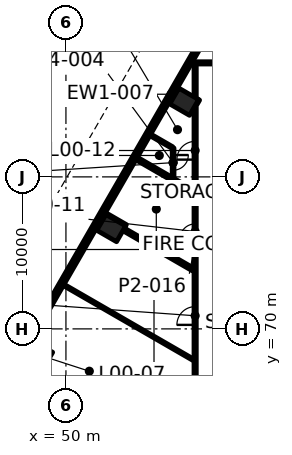
"""IFC4 building model, lengths in metres.
Left out: names, types, materials, properties, quantities, classifications, styles, units other than length and angle.
Written with IfcOpenShell. Run it as: python <this file> out.ifc"""

import sys

from ifc_helpers import new_model, si_unit, direction, frame, frame_2d, origin, origin_2d, place, context, subcontext, project, spatial, rectangle, extrude, element, fill, save


model = new_model("IFC4")
c1 = context("Model", 3, precision=1e-05, world=origin(), true_north=direction((0.0, 1.0)))
c2 = subcontext(c1, "Body", "Model", "MODEL_VIEW")
j1 = project(units=[si_unit("LENGTHUNIT", "METRE"), si_unit("PLANEANGLEUNIT", "RADIAN")], contexts=[c1])
p1 = place(None, origin())
s1 = spatial("IfcSite", under=j1, at=p1, CompositionType="ELEMENT")
p2 = place(p1, origin())
s2 = spatial("IfcBuilding", under=s1, at=p2, CompositionType="ELEMENT")
p3 = place(p2, origin())
s3 = spatial("IfcBuildingStorey", under=s2, at=p3, CompositionType="ELEMENT", Elevation=0.0)
for number, where, z_axis, x_axis in (
    (1, (57.78, 84.942, 0.0), (0.0, 0.0, 1.0), (-0.5, -0.866, 0.0)),
    (2, (52.979, 76.628, 0.0), (0.0, 0.0, 1.0), (-0.5, -0.866, 0.0)),
    (3, (48.179, 68.315, 0.0), (0.0, 0.0, 1.0), (-0.5, -0.866, 0.0)),
):
    element("IfcColumn", number, at=place(p3, frame(where, z_axis=z_axis, x_axis=x_axis)), inside=s3, PredefinedType="COLUMN", context=c2, shape_type="SweptSolid", body=[
        extrude(rectangle(XDim=1.2, YDim=1.5, at=origin_2d()), origin(), (0.0, 0.0, 1.0), 8.0),
    ])
p4 = place(p3, frame((58.563, 87.5, 0.0), z_axis=(0.0, 0.0, 1.0), x_axis=(1.0, 0.0, 0.0)))
e4 = element("IfcWall", 4, at=p4, inside=s3, PredefinedType="PARTITIONING", context=c2, shape_type="SweptSolid", body=[
    extrude(rectangle(XDim=9.662, YDim=0.15, at=frame_2d((4.831, 0.0))), origin(), (0.0, 0.0, 1.0), 6.865),
])
p5 = place(p4, frame((4.381, 0.0, 0.0)))
e5 = element("IfcOpeningElement", 5, at=p5, cuts=e4, PredefinedType="OPENING", context=c2, shape_type="SweptSolid", body=[
    extrude(rectangle(XDim=0.9, YDim=2.1, at=frame_2d((0.45, 1.05))), frame((0.0, 0.085, 0.0), z_axis=(0.0, -1.0, 0.0), x_axis=(1.0, 0.0, 0.0)), (0.0, 0.0, 1.0), 0.17),
])
p6 = place(p3, frame((58.575, 84.821, 0.0), z_axis=(0.0, 0.0, 1.0), x_axis=(0.500317227461, 0.865842174941, 0.0)))
e6 = element("IfcWall", 6, at=p6, inside=s3, PredefinedType="PARTITIONING", context=c2, shape_type="SweptSolid", body=[
    extrude(rectangle(XDim=0.308, YDim=0.15, at=frame_2d((0.154, 0.0))), origin(), (0.0, 0.0, 1.0), 7.1),
])
p7 = place(p3, frame((58.5, 66.513, 0.0), z_axis=(0.0, 0.0, 1.0), x_axis=(0.0, 1.0, 0.0)))
e7 = element("IfcWall", 7, at=p7, inside=s3, PredefinedType="PARTITIONING", context=c2, shape_type="SweptSolid", body=[
    extrude(rectangle(XDim=18.177, YDim=0.15, at=frame_2d((9.089, 0.0))), origin(), (0.0, 0.0, 1.0), 7.1),
])
p8 = place(p7, frame((3.75, 0.0, 0.0)))
e8 = element("IfcOpeningElement", 8, at=p8, cuts=e7, PredefinedType="OPENING", context=c2, shape_type="SweptSolid", body=[
    extrude(rectangle(XDim=1.2, YDim=2.1, at=frame_2d((0.6, 1.05))), frame((0.0, 0.085, 0.0), z_axis=(0.0, -1.0, 0.0), x_axis=(1.0, 0.0, 0.0)), (0.0, 0.0, 1.0), 0.17),
])
p9 = place(p7, frame((9.393, 0.0, 0.0)))
e9 = element("IfcOpeningElement", 9, at=p9, cuts=e7, PredefinedType="OPENING", context=c2, shape_type="SweptSolid", body=[
    extrude(rectangle(XDim=1.0, YDim=2.1, at=frame_2d((0.5, 1.05))), frame((0.0, 0.085, 0.0), z_axis=(0.0, -1.0, 0.0), x_axis=(1.0, 0.0, 0.0)), (0.0, 0.0, 1.0), 0.17),
])
p10 = place(p7, frame((14.623, 0.0, 0.0)))
e10 = element("IfcOpeningElement", 10, at=p10, cuts=e7, PredefinedType="OPENING", context=c2, shape_type="SweptSolid", body=[
    extrude(rectangle(XDim=1.2, YDim=2.1, at=frame_2d((0.6, 1.05))), frame((0.0, 0.085, 0.0), z_axis=(0.0, -1.0, 0.0), x_axis=(1.0, 0.0, 0.0)), (0.0, 0.0, 1.0), 0.17),
])
p11 = place(p3, frame((58.5, 85.219, 0.0), z_axis=(0.0, 0.0, 1.0), x_axis=(0.0, 1.0, 0.0)))
e11 = element("IfcWall", 11, at=p11, inside=s3, PredefinedType="PARTITIONING", context=c2, shape_type="SweptSolid", body=[
    extrude(rectangle(XDim=2.17, YDim=0.15, at=frame_2d((1.085, 0.0))), origin(), (0.0, 0.0, 1.0), 6.865),
])
p12 = place(p3, frame((57.05, 81.899, 0.0), z_axis=(0.0, 0.0, 1.0), x_axis=(0.0, -1.0, 0.0)))
e12 = element("IfcWall", 12, at=p12, inside=s3, PredefinedType="PARTITIONING", context=c2, shape_type="SweptSolid", body=[
    extrude(rectangle(XDim=1.923, YDim=0.12, at=frame_2d((0.961, 0.0))), origin(), (0.0, 0.0, 1.0), 7.1),
])
p13 = place(p12, frame((0.461, 0.0, 0.0)))
e13 = element("IfcOpeningElement", 13, at=p13, cuts=e12, PredefinedType="OPENING", context=c2, shape_type="SweptSolid", body=[
    extrude(rectangle(XDim=1.0, YDim=2.1, at=frame_2d((0.5, 1.05))), frame((0.0, 0.07, 0.0), z_axis=(0.0, -1.0, 0.0), x_axis=(1.0, 0.0, 0.0)), (0.0, 0.0, 1.0), 0.14),
])
p14 = place(p3, frame((56.99, 81.934, 0.0), z_axis=(0.0, 0.0, 1.0), x_axis=(-0.866055292018, 0.499948228488, 0.0)))
e14 = element("IfcWall", 14, at=p14, inside=s3, PredefinedType="PARTITIONING", context=c2, shape_type="SweptSolid", body=[
    extrude(rectangle(XDim=1.779, YDim=0.12, at=frame_2d((0.889, 0.0))), origin(), (0.0, 0.0, 1.0), 6.865),
])
p15 = place(p3, frame((58.373, 79.057, 0.0), z_axis=(0.0, 0.0, 1.0), x_axis=(-0.866032712554, 0.499987340626, 0.0)))
e15 = element("IfcWall", 15, at=p15, inside=s3, PredefinedType="PARTITIONING", context=c2, shape_type="SweptSolid", body=[
    extrude(rectangle(XDim=4.415, YDim=0.2, at=frame_2d((2.207, 0.0))), origin(), (0.0, 0.0, 1.0), 6.865),
])
p16 = place(p3, frame((53.928, 76.773, 0.0), z_axis=(0.0, 0.0, 1.0), x_axis=(-0.866026058841, 0.499998865407, 0.0)))
e16 = element("IfcWall", 16, at=p16, inside=s3, PredefinedType="PARTITIONING", context=c2, shape_type="SweptSolid", body=[
    extrude(rectangle(XDim=1.708, YDim=0.2, at=frame_2d((0.854, 0.0))), origin(), (0.0, 0.0, 1.0), 6.865),
])
p17 = place(p3, frame((58.373, 73.901, 0.0), z_axis=(0.0, 0.0, 1.0), x_axis=(-0.866022471755, 0.50000507839, 0.0)))
e17 = element("IfcWall", 17, at=p17, inside=s3, PredefinedType="PARTITIONING", context=c2, shape_type="SweptSolid", body=[
    extrude(rectangle(XDim=5.284, YDim=0.2, at=frame_2d((2.642, 0.0))), origin(), (0.0, 0.0, 1.0), 7.1),
])
p18 = place(p3, frame((58.399, 67.957, 0.0), z_axis=(0.0, 0.0, 1.0), x_axis=(-0.866029270811, 0.499993302054, 0.0)))
e18 = element("IfcWall", 18, at=p18, inside=s3, PredefinedType="PARTITIONING", context=c2, shape_type="SweptSolid", body=[
    extrude(rectangle(XDim=9.988, YDim=0.1, at=frame_2d((4.994, 0.0))), origin(), (0.0, 0.0, 1.0), 6.865),
])
p19 = place(p3, frame((71.348, 110.424, 0.0), z_axis=(0.0, 0.0, 1.0), x_axis=(-0.500000550228, -0.86602508611, 0.0)))
e19 = element("IfcWall", 19, at=p19, inside=s3, PredefinedType="SOLIDWALL", context=c2, shape_type="SweptSolid", body=[
    extrude(rectangle(XDim=57.704, YDim=0.3, at=frame_2d((28.852, 0.0))), origin(), (0.0, 0.0, 1.0), 7.7),
])
p20 = place(p19, frame((16.711, 0.0, 0.0)))
e20 = element("IfcOpeningElement", 20, at=p20, cuts=e19, PredefinedType="OPENING", context=c2, shape_type="SweptSolid", body=[
    extrude(rectangle(XDim=1.2, YDim=2.4, at=frame_2d((0.6, 1.2))), frame((0.0, 0.16, 0.0), z_axis=(0.0, -1.0, 0.0), x_axis=(1.0, 0.0, 0.0)), (0.0, 0.0, 1.0), 0.32),
])
p21 = place(p19, frame((1.552, 0.0, 0.15)))
e21 = element("IfcOpeningElement", 21, at=p21, cuts=e19, PredefinedType="OPENING", context=c2, shape_type="SweptSolid", body=[
    extrude(rectangle(XDim=2.1, YDim=5.4, at=frame_2d((1.05, 2.7))), frame((0.0, 0.16, 0.0), z_axis=(0.0, -1.0, 0.0), x_axis=(1.0, 0.0, 0.0)), (0.0, 0.0, 1.0), 0.32),
])
p22 = place(p19, frame((4.052, 0.0, 0.15)))
e22 = element("IfcOpeningElement", 22, at=p22, cuts=e19, PredefinedType="OPENING", context=c2, shape_type="SweptSolid", body=[
    extrude(rectangle(XDim=2.1, YDim=5.4, at=frame_2d((1.05, 2.7))), frame((0.0, 0.16, 0.0), z_axis=(0.0, -1.0, 0.0), x_axis=(1.0, 0.0, 0.0)), (0.0, 0.0, 1.0), 0.32),
])
p23 = place(p19, frame((6.552, 0.0, 0.15)))
e23 = element("IfcOpeningElement", 23, at=p23, cuts=e19, PredefinedType="OPENING", context=c2, shape_type="SweptSolid", body=[
    extrude(rectangle(XDim=2.1, YDim=5.4, at=frame_2d((1.05, 2.7))), frame((0.0, 0.16, 0.0), z_axis=(0.0, -1.0, 0.0), x_axis=(1.0, 0.0, 0.0)), (0.0, 0.0, 1.0), 0.32),
])
p24 = place(p19, frame((9.052, 0.0, 0.15)))
e24 = element("IfcOpeningElement", 24, at=p24, cuts=e19, PredefinedType="OPENING", context=c2, shape_type="SweptSolid", body=[
    extrude(rectangle(XDim=2.1, YDim=5.4, at=frame_2d((1.05, 2.7))), frame((0.0, 0.16, 0.0), z_axis=(0.0, -1.0, 0.0), x_axis=(1.0, 0.0, 0.0)), (0.0, 0.0, 1.0), 0.32),
])
p25 = place(p19, frame((11.552, 0.0, 0.15)))
e25 = element("IfcOpeningElement", 25, at=p25, cuts=e19, PredefinedType="OPENING", context=c2, shape_type="SweptSolid", body=[
    extrude(rectangle(XDim=2.1, YDim=5.4, at=frame_2d((1.05, 2.7))), frame((0.0, 0.16, 0.0), z_axis=(0.0, -1.0, 0.0), x_axis=(1.0, 0.0, 0.0)), (0.0, 0.0, 1.0), 0.32),
])
p26 = place(p19, frame((14.052, 0.0, 0.15)))
e26 = element("IfcOpeningElement", 26, at=p26, cuts=e19, PredefinedType="OPENING", context=c2, shape_type="SweptSolid", body=[
    extrude(rectangle(XDim=2.1, YDim=5.4, at=frame_2d((1.05, 2.7))), frame((0.0, 0.16, 0.0), z_axis=(0.0, -1.0, 0.0), x_axis=(1.0, 0.0, 0.0)), (0.0, 0.0, 1.0), 0.32),
])
p27 = place(p19, frame((19.052, 0.0, 0.15)))
e27 = element("IfcOpeningElement", 27, at=p27, cuts=e19, PredefinedType="OPENING", context=c2, shape_type="SweptSolid", body=[
    extrude(rectangle(XDim=2.1, YDim=5.4, at=frame_2d((1.05, 2.7))), frame((0.0, 0.16, 0.0), z_axis=(0.0, -1.0, 0.0), x_axis=(1.0, 0.0, 0.0)), (0.0, 0.0, 1.0), 0.32),
])
p28 = place(p19, frame((21.552, 0.0, 0.15)))
e28 = element("IfcOpeningElement", 28, at=p28, cuts=e19, PredefinedType="OPENING", context=c2, shape_type="SweptSolid", body=[
    extrude(rectangle(XDim=2.1, YDim=5.4, at=frame_2d((1.05, 2.7))), frame((0.0, 0.16, 0.0), z_axis=(0.0, -1.0, 0.0), x_axis=(1.0, 0.0, 0.0)), (0.0, 0.0, 1.0), 0.32),
])
p29 = place(p19, frame((24.052, 0.0, 0.15)))
e29 = element("IfcOpeningElement", 29, at=p29, cuts=e19, PredefinedType="OPENING", context=c2, shape_type="SweptSolid", body=[
    extrude(rectangle(XDim=2.1, YDim=5.4, at=frame_2d((1.05, 2.7))), frame((0.0, 0.16, 0.0), z_axis=(0.0, -1.0, 0.0), x_axis=(1.0, 0.0, 0.0)), (0.0, 0.0, 1.0), 0.32),
])
p30 = place(p19, frame((26.552, 0.0, 0.15)))
e30 = element("IfcOpeningElement", 30, at=p30, cuts=e19, PredefinedType="OPENING", context=c2, shape_type="SweptSolid", body=[
    extrude(rectangle(XDim=2.1, YDim=5.4, at=frame_2d((1.05, 2.7))), frame((0.0, 0.16, 0.0), z_axis=(0.0, -1.0, 0.0), x_axis=(1.0, 0.0, 0.0)), (0.0, 0.0, 1.0), 0.32),
])
p31 = place(p19, frame((29.052, 0.0, 0.15)))
e31 = element("IfcOpeningElement", 31, at=p31, cuts=e19, PredefinedType="OPENING", context=c2, shape_type="SweptSolid", body=[
    extrude(rectangle(XDim=2.1, YDim=5.4, at=frame_2d((1.05, 2.7))), frame((0.0, 0.16, 0.0), z_axis=(0.0, -1.0, 0.0), x_axis=(1.0, 0.0, 0.0)), (0.0, 0.0, 1.0), 0.32),
])
p32 = place(p19, frame((31.552, 0.0, 0.15)))
e32 = element("IfcOpeningElement", 32, at=p32, cuts=e19, PredefinedType="OPENING", context=c2, shape_type="SweptSolid", body=[
    extrude(rectangle(XDim=2.1, YDim=5.4, at=frame_2d((1.05, 2.7))), frame((0.0, 0.16, 0.0), z_axis=(0.0, -1.0, 0.0), x_axis=(1.0, 0.0, 0.0)), (0.0, 0.0, 1.0), 0.32),
])
p33 = place(p19, frame((34.052, 0.0, 0.15)))
e33 = element("IfcOpeningElement", 33, at=p33, cuts=e19, PredefinedType="OPENING", context=c2, shape_type="SweptSolid", body=[
    extrude(rectangle(XDim=2.1, YDim=5.4, at=frame_2d((1.05, 2.7))), frame((0.0, 0.16, 0.0), z_axis=(0.0, -1.0, 0.0), x_axis=(1.0, 0.0, 0.0)), (0.0, 0.0, 1.0), 0.32),
])
p34 = place(p19, frame((36.552, 0.0, 0.15)))
e34 = element("IfcOpeningElement", 34, at=p34, cuts=e19, PredefinedType="OPENING", context=c2, shape_type="SweptSolid", body=[
    extrude(rectangle(XDim=2.1, YDim=5.4, at=frame_2d((1.05, 2.7))), frame((0.0, 0.16, 0.0), z_axis=(0.0, -1.0, 0.0), x_axis=(1.0, 0.0, 0.0)), (0.0, 0.0, 1.0), 0.32),
])
p35 = place(p19, frame((39.052, 0.0, 0.15)))
e35 = element("IfcOpeningElement", 35, at=p35, cuts=e19, PredefinedType="OPENING", context=c2, shape_type="SweptSolid", body=[
    extrude(rectangle(XDim=2.1, YDim=5.4, at=frame_2d((1.05, 2.7))), frame((0.0, 0.16, 0.0), z_axis=(0.0, -1.0, 0.0), x_axis=(1.0, 0.0, 0.0)), (0.0, 0.0, 1.0), 0.32),
])
p36 = place(p19, frame((41.552, 0.0, 0.15)))
e36 = element("IfcOpeningElement", 36, at=p36, cuts=e19, PredefinedType="OPENING", context=c2, shape_type="SweptSolid", body=[
    extrude(rectangle(XDim=2.1, YDim=5.4, at=frame_2d((1.05, 2.7))), frame((0.0, 0.16, 0.0), z_axis=(0.0, -1.0, 0.0), x_axis=(1.0, 0.0, 0.0)), (0.0, 0.0, 1.0), 0.32),
])
p37 = place(p19, frame((44.052, 0.0, 0.15)))
e37 = element("IfcOpeningElement", 37, at=p37, cuts=e19, PredefinedType="OPENING", context=c2, shape_type="SweptSolid", body=[
    extrude(rectangle(XDim=2.1, YDim=5.4, at=frame_2d((1.05, 2.7))), frame((0.0, 0.16, 0.0), z_axis=(0.0, -1.0, 0.0), x_axis=(1.0, 0.0, 0.0)), (0.0, 0.0, 1.0), 0.32),
])
p38 = place(p19, frame((46.552, 0.0, 0.15)))
e38 = element("IfcOpeningElement", 38, at=p38, cuts=e19, PredefinedType="OPENING", context=c2, shape_type="SweptSolid", body=[
    extrude(rectangle(XDim=2.1, YDim=5.4, at=frame_2d((1.05, 2.7))), frame((0.0, 0.16, 0.0), z_axis=(0.0, -1.0, 0.0), x_axis=(1.0, 0.0, 0.0)), (0.0, 0.0, 1.0), 0.32),
])
p39 = place(p19, frame((49.052, 0.0, 0.15)))
e39 = element("IfcOpeningElement", 39, at=p39, cuts=e19, PredefinedType="OPENING", context=c2, shape_type="SweptSolid", body=[
    extrude(rectangle(XDim=2.1, YDim=5.4, at=frame_2d((1.05, 2.7))), frame((0.0, 0.16, 0.0), z_axis=(0.0, -1.0, 0.0), x_axis=(1.0, 0.0, 0.0)), (0.0, 0.0, 1.0), 0.32),
])
p40 = place(p19, frame((51.552, 0.0, 0.15)))
e40 = element("IfcOpeningElement", 40, at=p40, cuts=e19, PredefinedType="OPENING", context=c2, shape_type="SweptSolid", body=[
    extrude(rectangle(XDim=2.1, YDim=5.4, at=frame_2d((1.05, 2.7))), frame((0.0, 0.16, 0.0), z_axis=(0.0, -1.0, 0.0), x_axis=(1.0, 0.0, 0.0)), (0.0, 0.0, 1.0), 0.32),
])
p41 = place(p19, frame((54.052, 0.0, 0.15)))
e41 = element("IfcOpeningElement", 41, at=p41, cuts=e19, PredefinedType="OPENING", context=c2, shape_type="SweptSolid", body=[
    extrude(rectangle(XDim=2.1, YDim=5.4, at=frame_2d((1.05, 2.7))), frame((0.0, 0.16, 0.0), z_axis=(0.0, -1.0, 0.0), x_axis=(1.0, 0.0, 0.0)), (0.0, 0.0, 1.0), 0.32),
])
p42 = place(p8, origin())
e42 = element("IfcDoor", 42, at=p42, inside=s3, OperationType="DOUBLE_DOOR_SINGLE_SWING", PredefinedType="DOOR", context=c2, shape_type="SweptSolid", body=[
    extrude(rectangle(XDim=1.2, YDim=2.1, at=frame_2d((0.6, 1.05))), frame((0.0, 0.025, 0.0), z_axis=(0.0, -1.0, 0.0), x_axis=(1.0, 0.0, 0.0)), (0.0, 0.0, 1.0), 0.05),
])
fill(e8, e42)
p43 = place(p9, origin())
e43 = element("IfcDoor", 43, at=p43, inside=s3, OperationType="SINGLE_SWING_RIGHT", PredefinedType="DOOR", context=c2, shape_type="SweptSolid", body=[
    extrude(rectangle(XDim=1.0, YDim=2.1, at=frame_2d((0.5, 1.05))), frame((0.0, 0.025, 0.0), z_axis=(0.0, -1.0, 0.0), x_axis=(1.0, 0.0, 0.0)), (0.0, 0.0, 1.0), 0.05),
])
fill(e9, e43)
p44 = place(p10, origin())
e44 = element("IfcDoor", 44, at=p44, inside=s3, OperationType="DOUBLE_DOOR_SINGLE_SWING", PredefinedType="DOOR", context=c2, shape_type="SweptSolid", body=[
    extrude(rectangle(XDim=1.2, YDim=2.1, at=frame_2d((0.6, 1.05))), frame((0.0, 0.025, 0.0), z_axis=(0.0, -1.0, 0.0), x_axis=(1.0, 0.0, 0.0)), (0.0, 0.0, 1.0), 0.05),
])
fill(e10, e44)
p45 = place(p13, origin())
e45 = element("IfcDoor", 45, at=p45, inside=s3, OperationType="SINGLE_SWING_RIGHT", PredefinedType="DOOR", context=c2, shape_type="SweptSolid", body=[
    extrude(rectangle(XDim=1.0, YDim=2.1, at=frame_2d((0.5, 1.05))), frame((0.0, 0.025, 0.0), z_axis=(0.0, -1.0, 0.0), x_axis=(1.0, 0.0, 0.0)), (0.0, 0.0, 1.0), 0.05),
])
fill(e13, e45)
p46 = place(p29, origin())
e46 = element("IfcWindow", 46, at=p46, inside=s3, PartitioningType="SINGLE_PANEL", PredefinedType="WINDOW", context=c2, shape_type="SweptSolid", body=[
    extrude(rectangle(XDim=2.1, YDim=5.4, at=frame_2d((1.05, 2.7))), frame((0.0, 0.03, 0.0), z_axis=(0.0, -1.0, 0.0), x_axis=(1.0, 0.0, 0.0)), (0.0, 0.0, 1.0), 0.06),
])
fill(e29, e46)
p47 = place(p30, origin())
e47 = element("IfcWindow", 47, at=p47, inside=s3, PartitioningType="SINGLE_PANEL", PredefinedType="WINDOW", context=c2, shape_type="SweptSolid", body=[
    extrude(rectangle(XDim=2.1, YDim=5.4, at=frame_2d((1.05, 2.7))), frame((0.0, 0.03, 0.0), z_axis=(0.0, -1.0, 0.0), x_axis=(1.0, 0.0, 0.0)), (0.0, 0.0, 1.0), 0.06),
])
fill(e30, e47)
p48 = place(p31, origin())
e48 = element("IfcWindow", 48, at=p48, inside=s3, PartitioningType="SINGLE_PANEL", PredefinedType="WINDOW", context=c2, shape_type="SweptSolid", body=[
    extrude(rectangle(XDim=2.1, YDim=5.4, at=frame_2d((1.05, 2.7))), frame((0.0, 0.03, 0.0), z_axis=(0.0, -1.0, 0.0), x_axis=(1.0, 0.0, 0.0)), (0.0, 0.0, 1.0), 0.06),
])
fill(e31, e48)
p49 = place(p32, origin())
e49 = element("IfcWindow", 49, at=p49, inside=s3, PartitioningType="SINGLE_PANEL", PredefinedType="WINDOW", context=c2, shape_type="SweptSolid", body=[
    extrude(rectangle(XDim=2.1, YDim=5.4, at=frame_2d((1.05, 2.7))), frame((0.0, 0.03, 0.0), z_axis=(0.0, -1.0, 0.0), x_axis=(1.0, 0.0, 0.0)), (0.0, 0.0, 1.0), 0.06),
])
fill(e32, e49)
p50 = place(p33, origin())
e50 = element("IfcWindow", 50, at=p50, inside=s3, PartitioningType="SINGLE_PANEL", PredefinedType="WINDOW", context=c2, shape_type="SweptSolid", body=[
    extrude(rectangle(XDim=2.1, YDim=5.4, at=frame_2d((1.05, 2.7))), frame((0.0, 0.03, 0.0), z_axis=(0.0, -1.0, 0.0), x_axis=(1.0, 0.0, 0.0)), (0.0, 0.0, 1.0), 0.06),
])
fill(e33, e50)
p51 = place(p34, origin())
e51 = element("IfcWindow", 51, at=p51, inside=s3, PartitioningType="SINGLE_PANEL", PredefinedType="WINDOW", context=c2, shape_type="SweptSolid", body=[
    extrude(rectangle(XDim=2.1, YDim=5.4, at=frame_2d((1.05, 2.7))), frame((0.0, 0.03, 0.0), z_axis=(0.0, -1.0, 0.0), x_axis=(1.0, 0.0, 0.0)), (0.0, 0.0, 1.0), 0.06),
])
fill(e34, e51)
p52 = place(p35, origin())
e52 = element("IfcWindow", 52, at=p52, inside=s3, PartitioningType="SINGLE_PANEL", PredefinedType="WINDOW", context=c2, shape_type="SweptSolid", body=[
    extrude(rectangle(XDim=2.1, YDim=5.4, at=frame_2d((1.05, 2.7))), frame((0.0, 0.03, 0.0), z_axis=(0.0, -1.0, 0.0), x_axis=(1.0, 0.0, 0.0)), (0.0, 0.0, 1.0), 0.06),
])
fill(e35, e52)
p53 = place(p36, origin())
e53 = element("IfcWindow", 53, at=p53, inside=s3, PartitioningType="SINGLE_PANEL", PredefinedType="WINDOW", context=c2, shape_type="SweptSolid", body=[
    extrude(rectangle(XDim=2.1, YDim=5.4, at=frame_2d((1.05, 2.7))), frame((0.0, 0.03, 0.0), z_axis=(0.0, -1.0, 0.0), x_axis=(1.0, 0.0, 0.0)), (0.0, 0.0, 1.0), 0.06),
])
fill(e36, e53)
p54 = place(p37, origin())
e54 = element("IfcWindow", 54, at=p54, inside=s3, PartitioningType="SINGLE_PANEL", PredefinedType="WINDOW", context=c2, shape_type="SweptSolid", body=[
    extrude(rectangle(XDim=2.1, YDim=5.4, at=frame_2d((1.05, 2.7))), frame((0.0, 0.03, 0.0), z_axis=(0.0, -1.0, 0.0), x_axis=(1.0, 0.0, 0.0)), (0.0, 0.0, 1.0), 0.06),
])
fill(e37, e54)
save(model, sys.argv[1])
